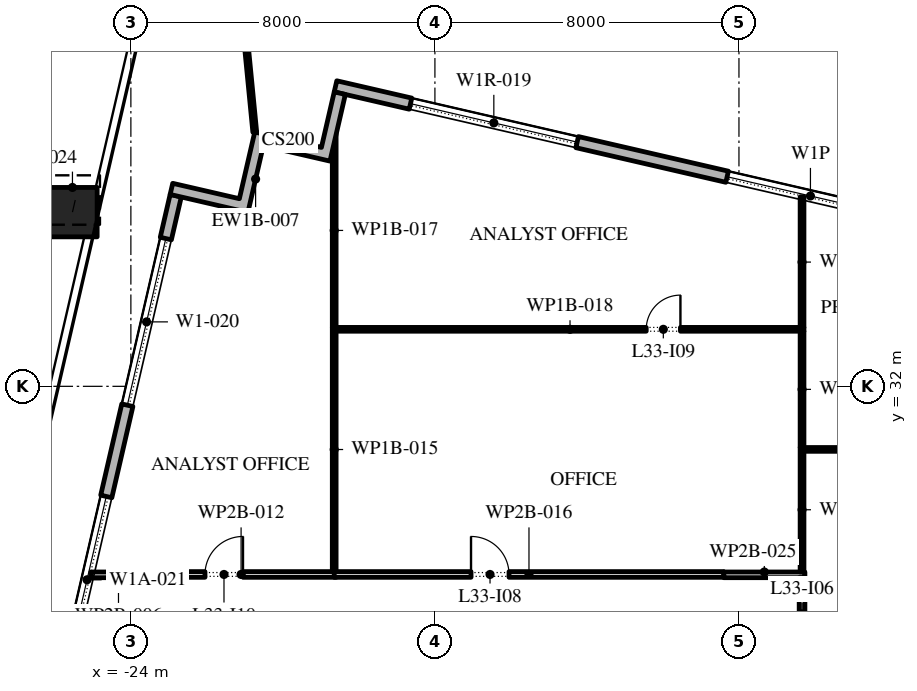
"""IFC4 building model, lengths in metres.
Left out: names, types, materials, properties, quantities, classifications, styles, units other than length and angle.
Written with IfcOpenShell. Run it as: python <this file> out.ifc"""

import sys

from ifc_helpers import new_model, si_unit, direction, frame, frame_2d, origin, origin_2d, place, context, subcontext, project, spatial, polyline, rectangle, outline, extrude, element, fill, save


model = new_model("IFC4")
c1 = context("Model", 3, precision=1e-05, world=origin(), true_north=direction((0.0, 1.0)))
c2 = subcontext(c1, "Body", "Model", "MODEL_VIEW")
j1 = project(units=[si_unit("LENGTHUNIT", "METRE"), si_unit("PLANEANGLEUNIT", "RADIAN")], contexts=[c1])
p1 = place(None, origin())
s1 = spatial("IfcSite", under=j1, at=p1, CompositionType="ELEMENT")
p2 = place(p1, origin())
s2 = spatial("IfcBuilding", under=s1, at=p2, CompositionType="ELEMENT")
p3 = place(p2, frame((0.0, 0.0, 151.8)))
s3 = spatial("IfcBuildingStorey", under=s2, at=p3, CompositionType="ELEMENT", Elevation=151.8)
p4 = place(p3, frame((-25.537, 36.583, 0.0), z_axis=(0.017502025619, 0.075687567741, 0.996977969259), x_axis=(-0.974290512438, 0.225295355862, 0.0)))
e1 = element("IfcColumn", 1, at=p4, inside=s3, PredefinedType="COLUMN", context=c2, shape_type="SweptSolid", body=[
    extrude(rectangle(XDim=1.3, YDim=1.3, at=origin_2d()), origin(), (0.0, 0.0, 1.0), 4.213),
])
p5 = place(p3, frame((31.078, 28.421, 0.0), z_axis=(0.0, 0.0, 1.0), x_axis=(-0.974370456532, 0.224949357493, 0.0)))
e2 = element("IfcWall", 2, at=p5, inside=s3, PredefinedType="STANDARD", context=c2, shape_type="SweptSolid", body=[
    extrude(rectangle(XDim=51.0, YDim=0.3, at=frame_2d((25.5, 0.0))), origin(), (0.0, 0.0, 1.0), 3.95),
])
p6 = place(p5, frame((1.875, 0.0, 0.45)))
e3 = element("IfcOpeningElement", 3, at=p6, cuts=e2, PredefinedType="OPENING", context=c2, shape_type="SweptSolid", body=[
    extrude(rectangle(XDim=4.5, YDim=2.775, at=frame_2d((2.25, 1.387))), frame((0.0, 0.16, 0.0), z_axis=(0.0, -1.0, 0.0), x_axis=(1.0, 0.0, 0.0)), (0.0, 0.0, 1.0), 0.32),
])
p7 = place(p5, frame((10.275, 0.0, 0.45)))
e4 = element("IfcOpeningElement", 4, at=p7, cuts=e2, PredefinedType="OPENING", context=c2, shape_type="SweptSolid", body=[
    extrude(rectangle(XDim=4.5, YDim=3.05, at=frame_2d((2.25, 1.525))), frame((0.0, 0.16, 0.0), z_axis=(0.0, -1.0, 0.0), x_axis=(1.0, 0.0, 0.0)), (0.0, 0.0, 1.0), 0.32),
])
p8 = place(p5, frame((18.825, 0.0, 0.45)))
e5 = element("IfcOpeningElement", 5, at=p8, cuts=e2, PredefinedType="OPENING", context=c2, shape_type="SweptSolid", body=[
    extrude(rectangle(XDim=4.5, YDim=2.625, at=frame_2d((2.25, 1.312))), frame((0.0, 0.16, 0.0), z_axis=(0.0, -1.0, 0.0), x_axis=(1.0, 0.0, 0.0)), (0.0, 0.0, 1.0), 0.32),
])
p9 = place(p5, frame((28.425, 0.0, 0.0)))
e6 = element("IfcOpeningElement", 6, at=p9, cuts=e2, PredefinedType="OPENING", context=c2, shape_type="SweptSolid", body=[
    extrude(rectangle(XDim=2.4, YDim=3.5, at=frame_2d((1.2, 1.75))), frame((0.0, 0.16, 0.0), z_axis=(0.0, -1.0, 0.0), x_axis=(1.0, 0.0, 0.0)), (0.0, 0.0, 1.0), 0.32),
])
p10 = place(p5, frame((35.925, 0.0, 0.45)))
e7 = element("IfcOpeningElement", 7, at=p10, cuts=e2, PredefinedType="OPENING", context=c2, shape_type="SweptSolid", body=[
    extrude(rectangle(XDim=4.5, YDim=2.475, at=frame_2d((2.25, 1.238))), frame((0.0, 0.16, 0.0), z_axis=(0.0, -1.0, 0.0), x_axis=(1.0, 0.0, 0.0)), (0.0, 0.0, 1.0), 0.32),
])
p11 = place(p5, frame((44.475, 0.0, 0.45)))
e8 = element("IfcOpeningElement", 8, at=p11, cuts=e2, PredefinedType="OPENING", context=c2, shape_type="SweptSolid", body=[
    extrude(rectangle(XDim=4.5, YDim=2.4, at=frame_2d((2.25, 1.2))), frame((0.0, 0.16, 0.0), z_axis=(0.0, -1.0, 0.0), x_axis=(1.0, 0.0, 0.0)), (0.0, 0.0, 1.0), 0.32),
])
p12 = place(p3, frame((-22.82, 37.016, 0.0), z_axis=(0.0, 0.0, 1.0), x_axis=(-0.224953880882, -0.974369412223, 0.0)))
e9 = element("IfcWall", 9, at=p12, inside=s3, PredefinedType="STANDARD", context=c2, shape_type="SweptSolid", body=[
    extrude(rectangle(XDim=49.5, YDim=0.3, at=frame_2d((24.75, 0.0))), origin(), (0.0, 0.0, 1.0), 3.95),
])
p13 = place(p12, frame((1.157, 0.0, 0.45)))
e10 = element("IfcOpeningElement", 10, at=p13, cuts=e9, PredefinedType="OPENING", context=c2, shape_type="SweptSolid", body=[
    extrude(rectangle(XDim=4.5, YDim=3.05, at=frame_2d((2.25, 1.525))), frame((0.0, 0.16, 0.0), z_axis=(0.0, -1.0, 0.0), x_axis=(1.0, 0.0, 0.0)), (0.0, 0.0, 1.0), 0.32),
])
p14 = place(p12, frame((8.121, 0.0, 0.45)))
e11 = element("IfcOpeningElement", 11, at=p14, cuts=e9, PredefinedType="OPENING", context=c2, shape_type="SweptSolid", body=[
    extrude(rectangle(XDim=4.5, YDim=3.0, at=frame_2d((2.25, 1.5))), frame((0.0, 0.16, 0.0), z_axis=(0.0, -1.0, 0.0), x_axis=(1.0, 0.0, 0.0)), (0.0, 0.0, 1.0), 0.32),
])
p15 = place(p12, frame((15.236, 0.0, 0.45)))
e12 = element("IfcOpeningElement", 12, at=p15, cuts=e9, PredefinedType="OPENING", context=c2, shape_type="SweptSolid", body=[
    extrude(rectangle(XDim=4.5, YDim=3.0, at=frame_2d((2.25, 1.5))), frame((0.0, 0.16, 0.0), z_axis=(0.0, -1.0, 0.0), x_axis=(1.0, 0.0, 0.0)), (0.0, 0.0, 1.0), 0.32),
])
p16 = place(p12, frame((23.4, 0.0, 0.0)))
e13 = element("IfcOpeningElement", 13, at=p16, cuts=e9, PredefinedType="OPENING", context=c2, shape_type="SweptSolid", body=[
    extrude(rectangle(XDim=2.4, YDim=3.5, at=frame_2d((1.2, 1.75))), frame((0.0, 0.16, 0.0), z_axis=(0.0, -1.0, 0.0), x_axis=(1.0, 0.0, 0.0)), (0.0, 0.0, 1.0), 0.32),
])
p17 = place(p12, frame((29.464, 0.0, 0.45)))
e14 = element("IfcOpeningElement", 14, at=p17, cuts=e9, PredefinedType="OPENING", context=c2, shape_type="SweptSolid", body=[
    extrude(rectangle(XDim=4.5, YDim=2.825, at=frame_2d((2.25, 1.413))), frame((0.0, 0.16, 0.0), z_axis=(0.0, -1.0, 0.0), x_axis=(1.0, 0.0, 0.0)), (0.0, 0.0, 1.0), 0.32),
])
p18 = place(p12, frame((36.579, 0.0, 0.45)))
e15 = element("IfcOpeningElement", 15, at=p18, cuts=e9, PredefinedType="OPENING", context=c2, shape_type="SweptSolid", body=[
    extrude(rectangle(XDim=4.5, YDim=2.625, at=frame_2d((2.25, 1.312))), frame((0.0, 0.16, 0.0), z_axis=(0.0, -1.0, 0.0), x_axis=(1.0, 0.0, 0.0)), (0.0, 0.0, 1.0), 0.32),
])
p19 = place(p12, frame((43.693, 0.0, 0.45)))
e16 = element("IfcOpeningElement", 16, at=p19, cuts=e9, PredefinedType="OPENING", context=c2, shape_type="SweptSolid", body=[
    extrude(rectangle(XDim=4.5, YDim=3.05, at=frame_2d((2.25, 1.525))), frame((0.0, 0.16, 0.0), z_axis=(0.0, -1.0, 0.0), x_axis=(1.0, 0.0, 0.0)), (0.0, 0.0, 1.0), 0.32),
])
p20 = place(p3, origin())
e17 = element("IfcWall", 17, at=p20, inside=s3, PredefinedType="STANDARD", context=c2, shape_type="SweptSolid", body=[
    extrude(outline(polyline([(-22.967, 37.049), (-22.899, 37.342), (-21.145, 36.937), (-20.74, 38.691), (-18.986, 38.286), (-18.649, 39.747), (-18.357, 39.68), (-18.762, 37.926), (-20.515, 38.331), (-20.92, 36.577), (-22.967, 37.049)])), origin(), (0.0, 0.0, 1.0), 3.95),
])
p21 = place(p3, frame((-20.74, 38.691, -0.05), z_axis=(0.0, 0.0, 1.0), x_axis=(-0.097012360204, 0.995283176773, 0.0)))
e18 = element("IfcWall", 18, at=p21, inside=s3, PredefinedType="STANDARD", context=c2, shape_type="SweptSolid", body=[
    extrude(rectangle(XDim=6.598, YDim=0.1, at=frame_2d((3.299, 0.0))), origin(), (0.0, 0.0, 1.0), 4.0),
])
p22 = place(p3, frame((-25.052, 27.04, 0.0), z_axis=(0.0, 0.0, 1.0), x_axis=(1.0, 0.0, 0.0)))
e19 = element("IfcWall", 19, at=p22, inside=s3, PredefinedType="PARTITIONING", context=c2, shape_type="SweptSolid", body=[
    extrude(rectangle(XDim=1.452, YDim=0.15, at=frame_2d((0.726, 0.0))), origin(), (0.0, 0.0, 1.0), 3.95),
])
p23 = place(p3, frame((-23.6, 27.05, 0.0), z_axis=(0.0, 0.0, 1.0), x_axis=(1.0, 0.0, 0.0)))
e20 = element("IfcWall", 20, at=p23, inside=s3, PredefinedType="PARTITIONING", context=c2, shape_type="SweptSolid", body=[
    extrude(rectangle(XDim=5.0, YDim=0.15, at=frame_2d((2.5, 0.0))), origin(), (0.0, 0.0, 1.0), 3.95),
])
p24 = place(p23, frame((1.55, 0.0, 0.0)))
e21 = element("IfcOpeningElement", 21, at=p24, cuts=e20, PredefinedType="OPENING", context=c2, shape_type="SweptSolid", body=[
    extrude(rectangle(XDim=1.0, YDim=2.1, at=frame_2d((0.5, 1.05))), frame((0.0, 0.085, 0.0), z_axis=(0.0, -1.0, 0.0), x_axis=(1.0, 0.0, 0.0)), (0.0, 0.0, 1.0), 0.17),
])
p25 = place(p3, frame((-18.65, 27.125, 0.0), z_axis=(0.0, 0.0, 1.0), x_axis=(0.0, 1.0, 0.0)))
e22 = element("IfcWall", 22, at=p25, inside=s3, PredefinedType="PARTITIONING", context=c2, shape_type="SweptSolid", body=[
    extrude(rectangle(XDim=6.425, YDim=0.1, at=frame_2d((3.212, 0.0))), origin(), (0.0, 0.0, 1.0), 3.95),
])
p26 = place(p3, frame((-18.65, 27.05, 0.0), z_axis=(0.0, 0.0, 1.0), x_axis=(1.0, 0.0, 0.0)))
e23 = element("IfcWall", 23, at=p26, inside=s3, PredefinedType="PARTITIONING", context=c2, shape_type="SweptSolid", body=[
    extrude(rectangle(XDim=10.25, YDim=0.15, at=frame_2d((5.125, 0.0))), origin(), (0.0, 0.0, 1.0), 3.95),
])
p27 = place(p26, frame((3.6, 0.0, 0.0)))
e24 = element("IfcOpeningElement", 24, at=p27, cuts=e23, PredefinedType="OPENING", context=c2, shape_type="SweptSolid", body=[
    extrude(rectangle(XDim=1.0, YDim=2.1, at=frame_2d((0.5, 1.05))), frame((0.0, 0.085, 0.0), z_axis=(0.0, -1.0, 0.0), x_axis=(1.0, 0.0, 0.0)), (0.0, 0.0, 1.0), 0.17),
])
p28 = place(p3, frame((-18.65, 33.55, 0.0), z_axis=(0.0, 0.0, 1.0), x_axis=(0.0, 1.0, 0.0)))
e25 = element("IfcWall", 25, at=p28, inside=s3, PredefinedType="PARTITIONING", context=c2, shape_type="SweptSolid", body=[
    extrude(rectangle(XDim=5.104, YDim=0.1, at=frame_2d((2.552, 0.0))), origin(), (0.0, 0.0, 1.0), 3.95),
])
p29 = place(p3, frame((-18.6, 33.5, 0.0), z_axis=(0.0, 0.0, 1.0), x_axis=(1.0, 0.0, 0.0)))
e26 = element("IfcWall", 26, at=p29, inside=s3, PredefinedType="PARTITIONING", context=c2, shape_type="SweptSolid", body=[
    extrude(rectangle(XDim=12.31, YDim=0.1, at=frame_2d((6.155, 0.0))), origin(), (0.0, 0.0, 1.0), 3.95),
])
p30 = place(p29, frame((8.16, 0.0, 0.0)))
e27 = element("IfcOpeningElement", 27, at=p30, cuts=e26, PredefinedType="OPENING", context=c2, shape_type="SweptSolid", body=[
    extrude(rectangle(XDim=0.9, YDim=2.1, at=frame_2d((0.45, 1.05))), frame((0.0, 0.06, 0.0), z_axis=(0.0, -1.0, 0.0), x_axis=(1.0, 0.0, 0.0)), (0.0, 0.0, 1.0), 0.12),
])
p31 = place(p3, frame((-8.4, 27.04, 0.0), z_axis=(0.0, 0.0, 1.0), x_axis=(1.0, 0.0, 0.0)))
e28 = element("IfcWall", 28, at=p31, inside=s3, PredefinedType="PARTITIONING", context=c2, shape_type="SweptSolid", body=[
    extrude(rectangle(XDim=2.135, YDim=0.15, at=frame_2d((1.067, 0.0))), origin(), (0.0, 0.0, 1.0), 3.95),
])
p32 = place(p3, frame((-6.34, 26.965, 0.0), z_axis=(0.0, 0.0, 1.0), x_axis=(0.0, -1.0, 0.0)))
e29 = element("IfcWall", 29, at=p32, inside=s3, PredefinedType="PARTITIONING", context=c2, shape_type="SweptSolid", body=[
    extrude(rectangle(XDim=3.48, YDim=0.15, at=frame_2d((1.74, 0.0))), origin(), (0.0, 0.0, 1.0), 3.95),
])
p33 = place(p32, frame((0.905, 0.0, 0.0)))
e30 = element("IfcOpeningElement", 30, at=p33, cuts=e29, PredefinedType="OPENING", context=c2, shape_type="SweptSolid", body=[
    extrude(rectangle(XDim=1.0, YDim=2.1, at=frame_2d((0.5, 1.05))), frame((0.0, 0.085, 0.0), z_axis=(0.0, -1.0, 0.0), x_axis=(1.0, 0.0, 0.0)), (0.0, 0.0, 1.0), 0.17),
])
p34 = place(p3, frame((-6.34, 27.115, 0.0), z_axis=(0.0, 0.0, 1.0), x_axis=(0.0, 1.0, 0.0)))
e31 = element("IfcWall", 31, at=p34, inside=s3, PredefinedType="PARTITIONING", context=c2, shape_type="SweptSolid", body=[
    extrude(rectangle(XDim=3.275, YDim=0.1, at=frame_2d((1.637, 0.0))), origin(), (0.0, 0.0, 1.0), 3.95),
])
p35 = place(p3, frame((-6.34, 30.39, 0.0), z_axis=(0.0, 0.0, 1.0), x_axis=(0.0, 1.0, 0.0)))
e32 = element("IfcWall", 32, at=p35, inside=s3, PredefinedType="PARTITIONING", context=c2, shape_type="SweptSolid", body=[
    extrude(rectangle(XDim=3.06, YDim=0.1, at=frame_2d((1.53, 0.0))), origin(), (0.0, 0.0, 1.0), 3.95),
])
p36 = place(p3, frame((-6.29, 30.34, 0.0), z_axis=(0.0, 0.0, 1.0), x_axis=(1.0, 0.0, 0.0)))
e33 = element("IfcWall", 33, at=p36, inside=s3, PredefinedType="PARTITIONING", context=c2, shape_type="SweptSolid", body=[
    extrude(rectangle(XDim=12.68, YDim=0.1, at=frame_2d((6.34, 0.0))), origin(), (0.0, 0.0, 1.0), 3.95),
])
p37 = place(p36, frame((8.28, 0.0, 0.0)))
e34 = element("IfcOpeningElement", 34, at=p37, cuts=e33, PredefinedType="OPENING", context=c2, shape_type="SweptSolid", body=[
    extrude(rectangle(XDim=0.9, YDim=2.1, at=frame_2d((0.45, 1.05))), frame((0.0, 0.06, 0.0), z_axis=(0.0, -1.0, 0.0), x_axis=(1.0, 0.0, 0.0)), (0.0, 0.0, 1.0), 0.12),
])
p38 = place(p3, frame((-6.34, 33.55, 0.0), z_axis=(0.0, 0.0, 1.0), x_axis=(0.0, 1.0, 0.0)))
e35 = element("IfcWall", 35, at=p38, inside=s3, PredefinedType="PARTITIONING", context=c2, shape_type="SweptSolid", body=[
    extrude(rectangle(XDim=3.438, YDim=0.1, at=frame_2d((1.719, 0.0))), origin(), (0.0, 0.0, 1.0), 3.95),
])
p39 = place(p10, origin())
e36 = element("IfcWindow", 36, at=p39, inside=s3, PartitioningType="DOUBLE_PANEL_VERTICAL", PredefinedType="WINDOW", context=c2, shape_type="SweptSolid", body=[
    extrude(rectangle(XDim=4.5, YDim=2.475, at=frame_2d((2.25, 1.238))), frame((0.0, 0.03, 0.0), z_axis=(0.0, -1.0, 0.0), x_axis=(1.0, 0.0, 0.0)), (0.0, 0.0, 1.0), 0.06),
])
fill(e7, e36)
p40 = place(p11, origin())
e37 = element("IfcWindow", 37, at=p40, inside=s3, PartitioningType="DOUBLE_PANEL_VERTICAL", PredefinedType="WINDOW", context=c2, shape_type="SweptSolid", body=[
    extrude(rectangle(XDim=4.5, YDim=2.4, at=frame_2d((2.25, 1.2))), frame((0.0, 0.03, 0.0), z_axis=(0.0, -1.0, 0.0), x_axis=(1.0, 0.0, 0.0)), (0.0, 0.0, 1.0), 0.06),
])
fill(e8, e37)
p41 = place(p13, origin())
e38 = element("IfcWindow", 38, at=p41, inside=s3, PartitioningType="DOUBLE_PANEL_VERTICAL", PredefinedType="WINDOW", context=c2, shape_type="SweptSolid", body=[
    extrude(rectangle(XDim=4.5, YDim=3.05, at=frame_2d((2.25, 1.525))), frame((0.0, 0.03, 0.0), z_axis=(0.0, -1.0, 0.0), x_axis=(1.0, 0.0, 0.0)), (0.0, 0.0, 1.0), 0.06),
])
fill(e10, e38)
p42 = place(p14, origin())
e39 = element("IfcWindow", 39, at=p42, inside=s3, PartitioningType="DOUBLE_PANEL_VERTICAL", PredefinedType="WINDOW", context=c2, shape_type="SweptSolid", body=[
    extrude(rectangle(XDim=4.5, YDim=3.0, at=frame_2d((2.25, 1.5))), frame((0.0, 0.03, 0.0), z_axis=(0.0, -1.0, 0.0), x_axis=(1.0, 0.0, 0.0)), (0.0, 0.0, 1.0), 0.06),
])
fill(e11, e39)
p43 = place(p27, origin())
e40 = element("IfcDoor", 40, at=p43, inside=s3, OperationType="SINGLE_SWING_RIGHT", PredefinedType="DOOR", context=c2, shape_type="SweptSolid", body=[
    extrude(rectangle(XDim=1.0, YDim=2.1, at=frame_2d((0.5, 1.05))), frame((0.0, 0.025, 0.0), z_axis=(0.0, -1.0, 0.0), x_axis=(1.0, 0.0, 0.0)), (0.0, 0.0, 1.0), 0.05),
])
fill(e24, e40)
p44 = place(p30, origin())
e41 = element("IfcDoor", 41, at=p44, inside=s3, OperationType="SINGLE_SWING_LEFT", PredefinedType="DOOR", context=c2, shape_type="SweptSolid", body=[
    extrude(rectangle(XDim=0.9, YDim=2.1, at=frame_2d((0.45, 1.05))), frame((0.0, 0.025, 0.0), z_axis=(0.0, -1.0, 0.0), x_axis=(1.0, 0.0, 0.0)), (0.0, 0.0, 1.0), 0.05),
])
fill(e27, e41)
p45 = place(p24, origin())
e42 = element("IfcDoor", 42, at=p45, inside=s3, OperationType="SINGLE_SWING_LEFT", PredefinedType="DOOR", context=c2, shape_type="SweptSolid", body=[
    extrude(rectangle(XDim=1.0, YDim=2.1, at=frame_2d((0.5, 1.05))), frame((0.0, 0.025, 0.0), z_axis=(0.0, -1.0, 0.0), x_axis=(1.0, 0.0, 0.0)), (0.0, 0.0, 1.0), 0.05),
])
fill(e21, e42)
save(model, sys.argv[1])
